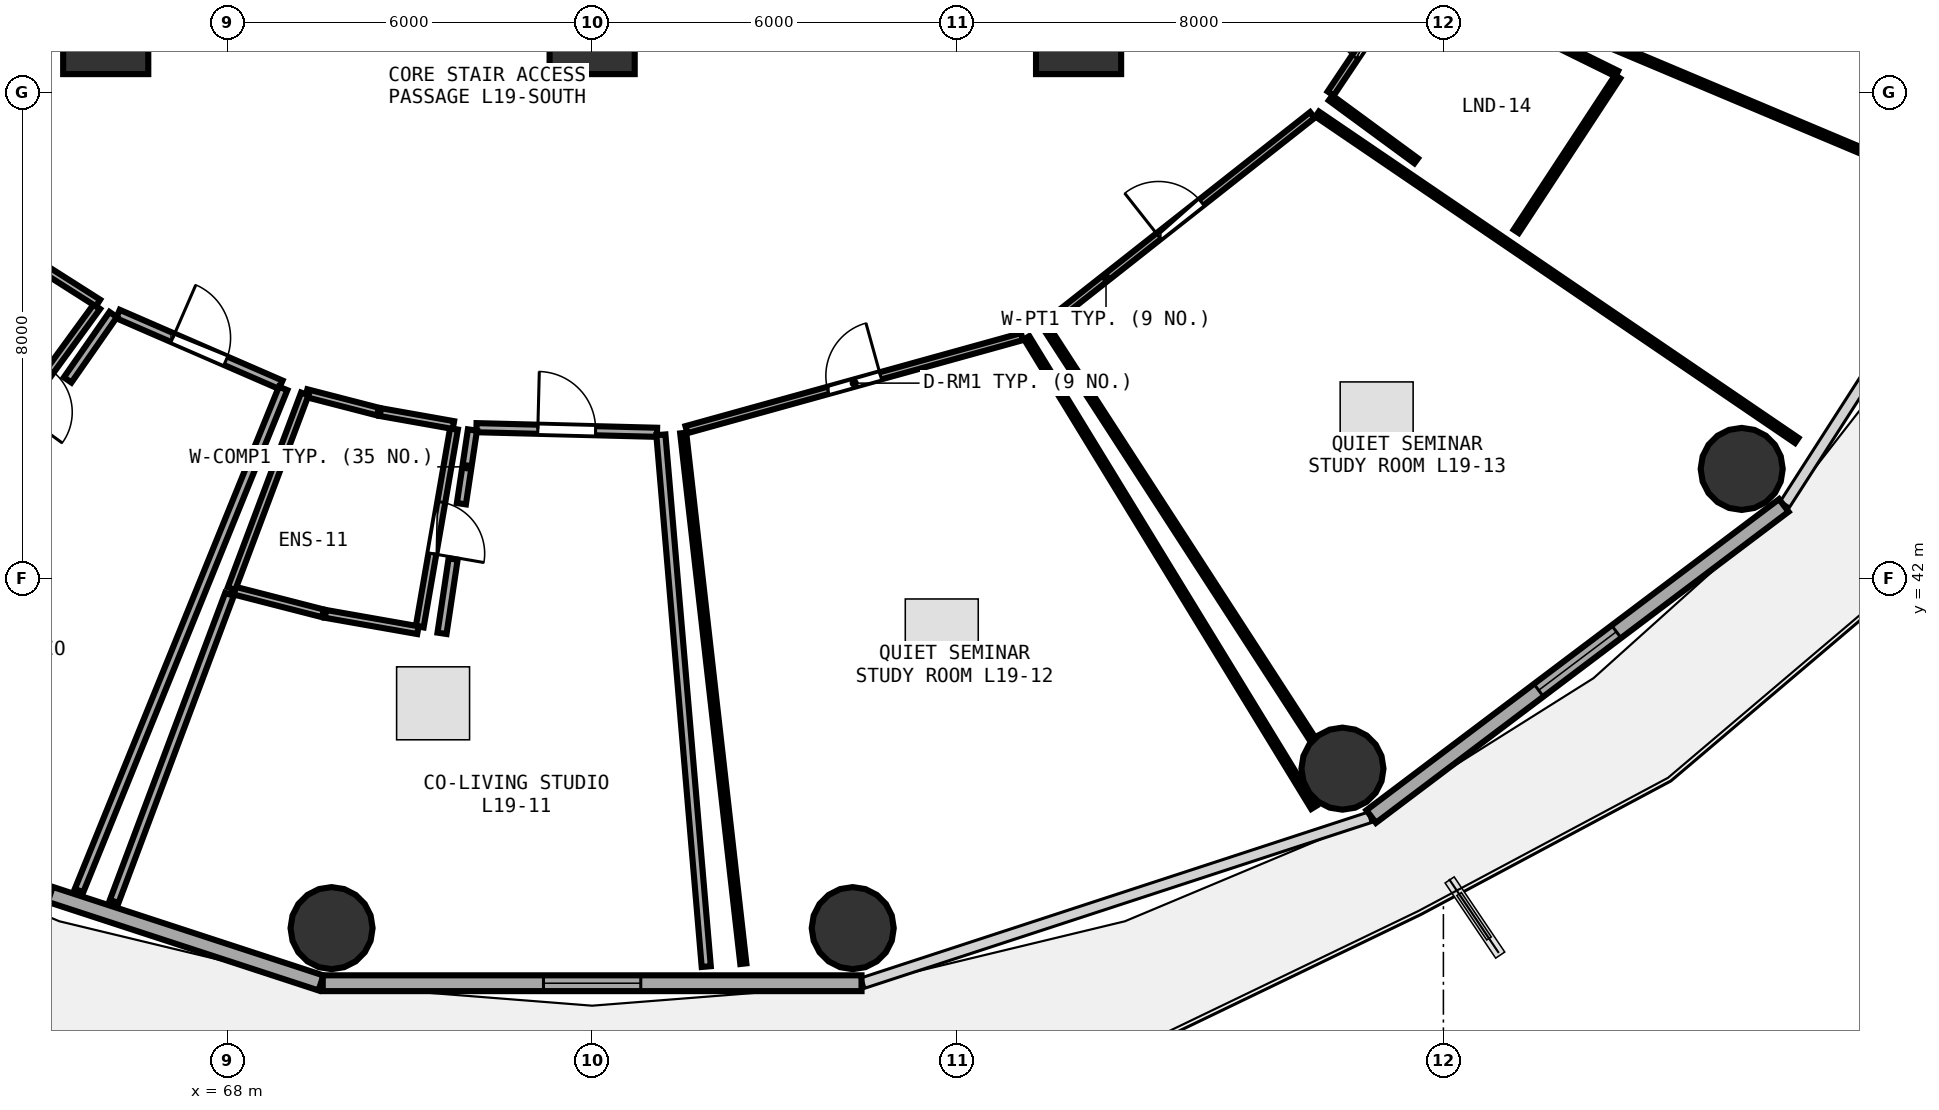
"""IFC4 building model, lengths in metres.
Left out: names, types, materials, properties, quantities, classifications, styles, units other than length and angle.
Written with IfcOpenShell. Run it as: python <this file> out.ifc"""

import sys

from ifc_helpers import new_model, si_unit, direction, frame, frame_2d, origin, origin_2d, place, context, subcontext, project, spatial, rectangle, circle, extrude, element, fill, save


model = new_model("IFC4")
c1 = context("Model", 3, precision=1e-05, world=origin(), true_north=direction((0.0, 1.0)))
c2 = subcontext(c1, "Body", "Model", "MODEL_VIEW")
j1 = project(units=[si_unit("LENGTHUNIT", "METRE"), si_unit("PLANEANGLEUNIT", "RADIAN")], contexts=[c1])
p1 = place(None, origin())
s1 = spatial("IfcSite", under=j1, at=p1, CompositionType="ELEMENT")
p2 = place(p1, origin())
s2 = spatial("IfcBuilding", under=s1, at=p2, CompositionType="ELEMENT")
p3 = place(p2, frame((0.0, 0.0, 76.35)))
s3 = spatial("IfcBuildingStorey", under=s2, at=p3, CompositionType="ELEMENT", Elevation=76.35)
for number, where, z_axis, x_axis in (
    (1, (66.0, 51.0, 0.0), (0.0, 0.0, 1.0), (1.0, 0.0, 0.0)),
    (2, (74.0, 51.0, 0.0), (0.0, 0.0, 1.0), (1.0, 0.0, 0.0)),
    (3, (82.0, 51.0, 0.0), (0.0, 0.0, 1.0), (1.0, 0.0, 0.0)),
):
    element("IfcColumn", number, at=place(p3, frame(where, z_axis=z_axis, x_axis=x_axis)), inside=s3, PredefinedType="PILASTER", context=c2, shape_type="SweptSolid", body=[
        extrude(rectangle(XDim=1.4, YDim=1.4, at=origin_2d()), origin(), (0.0, 0.0, 1.0), 3.75),
    ])
for number, where, z_axis, x_axis in (
    (4, (69.714, 36.255, 0.0), (0.0, 0.0, 1.0), (1.0, 0.0, 0.0)),
    (5, (78.286, 36.255, 0.0), (0.0, 0.0, 1.0), (1.0, 0.0, 0.0)),
    (6, (86.34, 38.878, 0.0), (0.0, 0.0, 1.0), (1.0, 0.0, 0.0)),
    (7, (92.906, 43.807, 0.0), (0.0, 0.0, 1.0), (1.0, 0.0, 0.0)),
):
    element("IfcColumn", number, at=place(p3, frame(where, z_axis=z_axis, x_axis=x_axis)), inside=s3, PredefinedType="COLUMN", context=c2, shape_type="SweptSolid", body=[
        extrude(circle(Radius=0.675, at=origin_2d()), origin(), (0.0, 0.0, 1.0), 3.75),
    ])
p4 = place(p3, frame((61.214, 38.077, 0.0), z_axis=(0.0, 0.0, 1.0), x_axis=(0.950471101963, -0.310812941064, 0.0)))
e8 = element("IfcWall", 8, at=p4, inside=s3, PredefinedType="SOLIDWALL", context=c2, shape_type="SweptSolid", body=[
    extrude(rectangle(XDim=8.76, YDim=0.26, at=frame_2d((4.38, 0.0))), origin(), (0.0, 0.0, 1.0), 3.475),
])
p5 = place(p4, frame((2.5, 0.0, 0.85)))
e9 = element("IfcOpeningElement", 9, at=p5, cuts=e8, PredefinedType="OPENING", context=c2, shape_type="SweptSolid", body=[
    extrude(rectangle(XDim=1.6, YDim=1.45, at=frame_2d((0.8, 0.725))), frame((0.0, 0.14, 0.0), z_axis=(0.0, -1.0, 0.0), x_axis=(1.0, 0.0, 0.0)), (0.0, 0.0, 1.0), 0.28),
])
p6 = place(p3, frame((69.57, 35.349, 0.0), z_axis=(0.0, 0.0, 1.0), x_axis=(1.0, 0.0, 0.0)))
e10 = element("IfcWall", 10, at=p6, inside=s3, PredefinedType="SOLIDWALL", context=c2, shape_type="SweptSolid", body=[
    extrude(rectangle(XDim=8.861, YDim=0.26, at=frame_2d((4.43, 0.0))), origin(), (0.0, 0.0, 1.0), 3.475),
])
p7 = place(p6, frame((3.63, 0.0, 0.85)))
e11 = element("IfcOpeningElement", 11, at=p7, cuts=e10, PredefinedType="OPENING", context=c2, shape_type="SweptSolid", body=[
    extrude(rectangle(XDim=1.6, YDim=1.45, at=frame_2d((0.8, 0.725))), frame((0.0, 0.14, 0.0), z_axis=(0.0, -1.0, 0.0), x_axis=(1.0, 0.0, 0.0)), (0.0, 0.0, 1.0), 0.28),
])
p8 = place(p3, frame((86.812, 38.09, 0.0), z_axis=(0.0, 0.0, 1.0), x_axis=(0.798501507879, 0.601992808857, 0.0)))
e12 = element("IfcWall", 12, at=p8, inside=s3, PredefinedType="SOLIDWALL", context=c2, shape_type="SweptSolid", body=[
    extrude(rectangle(XDim=8.499, YDim=0.26, at=frame_2d((4.25, 0.0))), origin(), (0.0, 0.0, 1.0), 3.475),
])
p9 = place(p8, frame((3.45, 0.0, 0.85)))
e13 = element("IfcOpeningElement", 13, at=p9, cuts=e12, PredefinedType="OPENING", context=c2, shape_type="SweptSolid", body=[
    extrude(rectangle(XDim=1.6, YDim=1.45, at=frame_2d((0.8, 0.725))), frame((0.0, 0.14, 0.0), z_axis=(0.0, -1.0, 0.0), x_axis=(1.0, 0.0, 0.0)), (0.0, 0.0, 1.0), 0.28),
])
p10 = place(p3, frame((65.855, 46.477, 0.0), z_axis=(0.0, 0.0, 1.0), x_axis=(-0.589016516568, -0.808120995402, 0.0)))
e14 = element("IfcWall", 14, at=p10, inside=s3, PredefinedType="PLUMBINGWALL", context=c2, shape_type="SweptSolid", body=[
    extrude(rectangle(XDim=3.435, YDim=0.13, at=frame_2d((1.718, 0.0))), origin(), (0.0, 0.0, 1.0), 3.175),
])
p11 = place(p10, frame((1.288, 0.0, 0.0)))
e15 = element("IfcOpeningElement", 15, at=p11, cuts=e14, PredefinedType="OPENING", context=c2, shape_type="SweptSolid", body=[
    extrude(rectangle(XDim=0.86, YDim=2.05, at=frame_2d((0.43, 1.025))), frame((0.0, 0.075, 0.0), z_axis=(0.0, -1.0, 0.0), x_axis=(1.0, 0.0, 0.0)), (0.0, 0.0, 1.0), 0.15),
])
p12 = place(p3, frame((66.201, 46.355, 0.0), z_axis=(0.0, 0.0, 1.0), x_axis=(0.917173751057, -0.398487528503, 0.0)))
e16 = element("IfcWall", 16, at=p12, inside=s3, PredefinedType="PARTITIONING", context=c2, shape_type="SweptSolid", body=[
    extrude(rectangle(XDim=2.919, YDim=0.15, at=frame_2d((1.459, 0.0))), origin(), (0.0, 0.0, 1.0), 2.925),
])
p13 = place(p12, frame((0.984, 0.0, 0.0)))
e17 = element("IfcOpeningElement", 17, at=p13, cuts=e16, PredefinedType="OPENING", context=c2, shape_type="SweptSolid", body=[
    extrude(rectangle(XDim=0.95, YDim=2.08, at=frame_2d((0.475, 1.04))), frame((0.0, 0.085, 0.0), z_axis=(0.0, -1.0, 0.0), x_axis=(1.0, 0.0, 0.0)), (0.0, 0.0, 1.0), 0.17),
])
p14 = place(p3, frame((71.728, 44.466, 0.0), z_axis=(0.0, 0.0, 1.0), x_axis=(-0.170592496202, -0.985341666753, 0.0)))
e18 = element("IfcWall", 18, at=p14, inside=s3, PredefinedType="PLUMBINGWALL", context=c2, shape_type="SweptSolid", body=[
    extrude(rectangle(XDim=3.303, YDim=0.13, at=frame_2d((1.651, 0.0))), origin(), (0.0, 0.0, 1.0), 3.175),
])
p15 = place(p14, frame((1.222, 0.0, 0.0)))
e19 = element("IfcOpeningElement", 19, at=p15, cuts=e18, PredefinedType="OPENING", context=c2, shape_type="SweptSolid", body=[
    extrude(rectangle(XDim=0.86, YDim=2.05, at=frame_2d((0.43, 1.025))), frame((0.0, 0.075, 0.0), z_axis=(0.0, -1.0, 0.0), x_axis=(1.0, 0.0, 0.0)), (0.0, 0.0, 1.0), 0.15),
])
p16 = place(p3, frame((72.097, 44.486, 0.0), z_axis=(0.0, 0.0, 1.0), x_axis=(0.999671268913, -0.025638917871, 0.0)))
e20 = element("IfcWall", 20, at=p16, inside=s3, PredefinedType="PARTITIONING", context=c2, shape_type="SweptSolid", body=[
    extrude(rectangle(XDim=2.971, YDim=0.15, at=frame_2d((1.485, 0.0))), origin(), (0.0, 0.0, 1.0), 3.48),
])
p17 = place(p16, frame((1.01, 0.0, 0.0)))
e21 = element("IfcOpeningElement", 21, at=p17, cuts=e20, PredefinedType="OPENING", context=c2, shape_type="SweptSolid", body=[
    extrude(rectangle(XDim=0.95, YDim=2.08, at=frame_2d((0.475, 1.04))), frame((0.0, 0.085, 0.0), z_axis=(0.0, -1.0, 0.0), x_axis=(1.0, 0.0, 0.0)), (0.0, 0.0, 1.0), 0.17),
])
p18 = place(p3, frame((75.551, 44.453, 0.0), z_axis=(0.0, 0.0, 1.0), x_axis=(0.963633279283, 0.267228185374, 0.0)))
e22 = element("IfcWall", 22, at=p18, inside=s3, PredefinedType="PARTITIONING", context=c2, shape_type="SweptSolid", body=[
    extrude(rectangle(XDim=5.726, YDim=0.12, at=frame_2d((2.863, 0.0))), origin(), (0.0, 0.0, 1.0), 2.925),
])
p19 = place(p18, frame((2.413, 0.0, 0.0)))
e23 = element("IfcOpeningElement", 23, at=p19, cuts=e22, PredefinedType="OPENING", context=c2, shape_type="SweptSolid", body=[
    extrude(rectangle(XDim=0.9, YDim=2.08, at=frame_2d((0.45, 1.04))), frame((0.0, 0.07, 0.0), z_axis=(0.0, -1.0, 0.0), x_axis=(1.0, 0.0, 0.0)), (0.0, 0.0, 1.0), 0.14),
])
p20 = place(p3, frame((81.494, 46.198, 0.0), z_axis=(0.0, 0.0, 1.0), x_axis=(0.785315722545, 0.619095482074, 0.0)))
e24 = element("IfcWall", 24, at=p20, inside=s3, PredefinedType="PARTITIONING", context=c2, shape_type="SweptSolid", body=[
    extrude(rectangle(XDim=5.54, YDim=0.12, at=frame_2d((2.77, 0.0))), origin(), (0.0, 0.0, 1.0), 2.925),
])
p21 = place(p20, frame((2.32, 0.0, 0.0)))
e25 = element("IfcOpeningElement", 25, at=p21, cuts=e24, PredefinedType="OPENING", context=c2, shape_type="SweptSolid", body=[
    extrude(rectangle(XDim=0.9, YDim=2.08, at=frame_2d((0.45, 1.04))), frame((0.0, 0.07, 0.0), z_axis=(0.0, -1.0, 0.0), x_axis=(1.0, 0.0, 0.0)), (0.0, 0.0, 1.0), 0.14),
])
p22 = place(p3, frame((86.146, 49.981, 0.0), z_axis=(0.0, 0.0, 1.0), x_axis=(0.556604342457, 0.83077771152, 0.0)))
e26 = element("IfcWall", 26, at=p22, inside=s3, PredefinedType="PARTITIONING", context=c2, shape_type="SweptSolid", body=[
    extrude(rectangle(XDim=2.336, YDim=0.12, at=frame_2d((1.168, 0.0))), origin(), (0.0, 0.0, 1.0), 2.925),
])
p23 = place(p22, frame((0.718, 0.0, 0.0)))
e27 = element("IfcOpeningElement", 27, at=p23, cuts=e26, PredefinedType="OPENING", context=c2, shape_type="SweptSolid", body=[
    extrude(rectangle(XDim=0.9, YDim=2.08, at=frame_2d((0.45, 1.04))), frame((0.0, 0.07, 0.0), z_axis=(0.0, -1.0, 0.0), x_axis=(1.0, 0.0, 0.0)), (0.0, 0.0, 1.0), 0.14),
])
p24 = place(p3, frame((64.872, 47.172, 0.0), z_axis=(0.0, 0.0, 1.0), x_axis=(0.843822426876, -0.536622504095, 0.0)))
e28 = element("IfcWall", 28, at=p24, inside=s3, PredefinedType="PLUMBINGWALL", context=c2, shape_type="SweptSolid", body=[
    extrude(rectangle(XDim=1.187, YDim=0.13, at=frame_2d((0.593, 0.0))), origin(), (0.0, 0.0, 1.0), 3.48),
])
p25 = place(p3, frame((68.918, 45.131, 0.0), z_axis=(0.0, 0.0, 1.0), x_axis=(-0.376588613193, -0.926380600193, 0.0)))
e29 = element("IfcWall", 29, at=p25, inside=s3, PredefinedType="PARTITIONING", context=c2, shape_type="SweptSolid", body=[
    extrude(rectangle(XDim=8.914, YDim=0.15, at=frame_2d((4.457, 0.0))), origin(), (0.0, 0.0, 1.0), 2.925),
])
p26 = place(p3, frame((65.374, 45.27, 0.0), z_axis=(0.0, 0.0, 1.0), x_axis=(0.57134818524, 0.82070777456, 0.0)))
e30 = element("IfcWall", 30, at=p26, inside=s3, PredefinedType="PARTITIONING", context=c2, shape_type="SweptSolid", body=[
    extrude(rectangle(XDim=1.311, YDim=0.15, at=frame_2d((0.656, 0.0))), origin(), (0.0, 0.0, 1.0), 3.235),
])
p27 = place(p3, frame((69.3, 45.054, 0.0), z_axis=(0.0, 0.0, 1.0), x_axis=(0.968247539973, -0.249993402585, 0.0)))
e31 = element("IfcWall", 31, at=p27, inside=s3, PredefinedType="PLUMBINGWALL", context=c2, shape_type="SweptSolid", body=[
    extrude(rectangle(XDim=1.216, YDim=0.13, at=frame_2d((0.608, 0.0))), origin(), (0.0, 0.0, 1.0), 3.48),
])
p28 = place(p3, frame((70.517, 44.741, 0.0), z_axis=(0.0, 0.0, 1.0), x_axis=(0.98466652622, -0.174447218786, 0.0)))
e32 = element("IfcWall", 32, at=p28, inside=s3, PredefinedType="PLUMBINGWALL", context=c2, shape_type="SweptSolid", body=[
    extrude(rectangle(XDim=1.22, YDim=0.13, at=frame_2d((0.61, 0.0))), origin(), (0.0, 0.0, 1.0), 3.48),
])
p29 = place(p3, frame((71.134, 41.156, 0.0), z_axis=(0.0, 0.0, 1.0), x_axis=(-0.984831248295, 0.173514876545, 0.0)))
e33 = element("IfcWall", 33, at=p29, inside=s3, PredefinedType="PLUMBINGWALL", context=c2, shape_type="SweptSolid", body=[
    extrude(rectangle(XDim=1.545, YDim=0.13, at=frame_2d((0.772, 0.0))), origin(), (0.0, 0.0, 1.0), 3.48),
])
p30 = place(p3, frame((69.573, 41.432, 0.0), z_axis=(0.0, 0.0, 1.0), x_axis=(-0.968594416315, 0.248646046989, 0.0)))
e34 = element("IfcWall", 34, at=p30, inside=s3, PredefinedType="PLUMBINGWALL", context=c2, shape_type="SweptSolid", body=[
    extrude(rectangle(XDim=1.541, YDim=0.13, at=frame_2d((0.77, 0.0))), origin(), (0.0, 0.0, 1.0), 2.925),
])
p31 = place(p3, frame((68.069, 41.839, 0.0), z_axis=(0.0, 0.0, 1.0), x_axis=(0.352202531552, 0.935923809275, 0.0)))
e35 = element("IfcWall", 35, at=p31, inside=s3, PredefinedType="PLUMBINGWALL", context=c2, shape_type="SweptSolid", body=[
    extrude(rectangle(XDim=3.421, YDim=0.13, at=frame_2d((1.71, 0.0))), origin(), (0.0, 0.0, 1.0), 2.925),
])
p32 = place(p3, frame((75.13, 44.368, 0.0), z_axis=(0.0, 0.0, 1.0), x_axis=(0.085031915446, -0.996378228062, 0.0)))
e36 = element("IfcWall", 36, at=p32, inside=s3, PredefinedType="PARTITIONING", context=c2, shape_type="SweptSolid", body=[
    extrude(rectangle(XDim=8.777, YDim=0.15, at=frame_2d((4.389, 0.0))), origin(), (0.0, 0.0, 1.0), 2.975),
])
p33 = place(p3, frame((66.139, 36.694, 0.0), z_axis=(0.0, 0.0, 1.0), x_axis=(0.351589591196, 0.936154239088, 0.0)))
e37 = element("IfcWall", 37, at=p33, inside=s3, PredefinedType="PARTITIONING", context=c2, shape_type="SweptSolid", body=[
    extrude(rectangle(XDim=5.395, YDim=0.15, at=frame_2d((2.697, 0.0))), origin(), (0.0, 0.0, 1.0), 2.975),
])
p34 = place(p3, frame((71.531, 41.104, 0.0), z_axis=(0.0, 0.0, 1.0), x_axis=(0.147866770411, 0.989007289259, 0.0)))
e38 = element("IfcWall", 38, at=p34, inside=s3, PredefinedType="PARTITIONING", context=c2, shape_type="SweptSolid", body=[
    extrude(rectangle(XDim=1.235, YDim=0.15, at=frame_2d((0.618, 0.0))), origin(), (0.0, 0.0, 1.0), 3.175),
])
p35 = place(p3, frame((71.85, 43.235, 0.0), z_axis=(0.0, 0.0, 1.0), x_axis=(0.14797037904, 0.988991793154, 0.0)))
e39 = element("IfcWall", 39, at=p35, inside=s3, PredefinedType="PARTITIONING", context=c2, shape_type="SweptSolid", body=[
    extrude(rectangle(XDim=1.226, YDim=0.15, at=frame_2d((0.613, 0.0))), origin(), (0.0, 0.0, 1.0), 3.48),
])
p36 = place(p3, frame((81.147, 45.965, 0.0), z_axis=(0.0, 0.0, 1.0), x_axis=(0.521624536189, -0.853175153908, 0.0)))
e40 = element("IfcWall", 40, at=p36, inside=s3, PredefinedType="PARTITIONING", context=c2, shape_type="SweptSolid", body=[
    extrude(rectangle(XDim=9.053, YDim=0.1, at=frame_2d((4.526, 0.0))), origin(), (0.0, 0.0, 1.0), 2.975),
])
p37 = place(p3, frame((76.487, 35.671, 0.0), z_axis=(0.0, 0.0, 1.0), x_axis=(-0.112612784854, 0.993638948858, 0.0)))
e41 = element("IfcWall", 41, at=p37, inside=s3, PredefinedType="PARTITIONING", context=c2, shape_type="SweptSolid", body=[
    extrude(rectangle(XDim=8.782, YDim=0.1, at=frame_2d((4.391, 0.0))), origin(), (0.0, 0.0, 1.0), 2.975),
])
p38 = place(p3, frame((85.925, 49.643, 0.0), z_axis=(0.0, 0.0, 1.0), x_axis=(0.826688408753, -0.562659999319, 0.0)))
e42 = element("IfcWall", 42, at=p38, inside=s3, PredefinedType="PARTITIONING", context=c2, shape_type="SweptSolid", body=[
    extrude(rectangle(XDim=9.539, YDim=0.1, at=frame_2d((4.77, 0.0))), origin(), (0.0, 0.0, 1.0), 2.975),
])
p39 = place(p3, frame((85.844, 39.372, 0.0), z_axis=(0.0, 0.0, 1.0), x_axis=(-0.543590830013, 0.839350349691, 0.0)))
e43 = element("IfcWall", 43, at=p39, inside=s3, PredefinedType="PARTITIONING", context=c2, shape_type="SweptSolid", body=[
    extrude(rectangle(XDim=8.048, YDim=0.1, at=frame_2d((4.024, 0.0))), origin(), (0.0, 0.0, 1.0), 3.175),
])
p40 = place(p3, frame((87.516, 51.953, 0.0), z_axis=(0.0, 0.0, 1.0), x_axis=(0.896816300292, -0.442403123328, 0.0)))
e44 = element("IfcWall", 44, at=p40, inside=s3, PredefinedType="PARTITIONING", context=c2, shape_type="SweptSolid", body=[
    extrude(rectangle(XDim=3.72, YDim=0.1, at=frame_2d((1.86, 0.0))), origin(), (0.0, 0.0, 1.0), 2.925),
])
p41 = place(p3, frame((90.866, 50.257, 0.0), z_axis=(0.0, 0.0, 1.0), x_axis=(-0.548626626693, -0.836067476035, 0.0)))
e45 = element("IfcWall", 45, at=p41, inside=s3, PredefinedType="PARTITIONING", context=c2, shape_type="SweptSolid", body=[
    extrude(rectangle(XDim=3.041, YDim=0.1, at=frame_2d((1.521, 0.0))), origin(), (0.0, 0.0, 1.0), 3.175),
])
p42 = place(p3, frame((87.552, 48.874, 0.0), z_axis=(0.0, 0.0, 1.0), x_axis=(-0.805902241708, 0.592048627065, 0.0)))
e46 = element("IfcWall", 46, at=p42, inside=s3, PredefinedType="PARTITIONING", context=c2, shape_type="SweptSolid", body=[
    extrude(rectangle(XDim=1.746, YDim=0.1, at=frame_2d((0.873, 0.0))), origin(), (0.0, 0.0, 1.0), 3.235),
])
p43 = place(p3, frame((96.59, 48.319, 0.0), z_axis=(0.0, 0.0, 1.0), x_axis=(-0.92163364156, 0.388061117279, 0.0)))
e47 = element("IfcWall", 47, at=p43, inside=s3, PredefinedType="PARTITIONING", context=c2, shape_type="SweptSolid", body=[
    extrude(rectangle(XDim=7.953, YDim=0.1, at=frame_2d((3.977, 0.0))), origin(), (0.0, 0.0, 1.0), 2.925),
])
p44 = place(p7, origin())
e48 = element("IfcWindow", 48, at=p44, inside=s3, PartitioningType="SINGLE_PANEL", PredefinedType="WINDOW", context=c2, shape_type="SweptSolid", body=[
    extrude(rectangle(XDim=1.6, YDim=1.45, at=frame_2d((0.8, 0.725))), frame((0.0, 0.03, 0.0), z_axis=(0.0, -1.0, 0.0), x_axis=(1.0, 0.0, 0.0)), (0.0, 0.0, 1.0), 0.06),
])
fill(e11, e48)
p45 = place(p9, origin())
e49 = element("IfcWindow", 49, at=p45, inside=s3, PartitioningType="SINGLE_PANEL", PredefinedType="WINDOW", context=c2, shape_type="SweptSolid", body=[
    extrude(rectangle(XDim=1.6, YDim=1.45, at=frame_2d((0.8, 0.725))), frame((0.0, 0.03, 0.0), z_axis=(0.0, -1.0, 0.0), x_axis=(1.0, 0.0, 0.0)), (0.0, 0.0, 1.0), 0.06),
])
fill(e13, e49)
p46 = place(p13, origin())
e50 = element("IfcDoor", 50, at=p46, inside=s3, OperationType="SINGLE_SWING_LEFT", PredefinedType="DOOR", context=c2, shape_type="SweptSolid", body=[
    extrude(rectangle(XDim=0.95, YDim=2.08, at=frame_2d((0.475, 1.04))), frame((0.0, 0.025, 0.0), z_axis=(0.0, -1.0, 0.0), x_axis=(1.0, 0.0, 0.0)), (0.0, 0.0, 1.0), 0.05),
])
fill(e17, e50)
p47 = place(p15, origin())
e51 = element("IfcDoor", 51, at=p47, inside=s3, OperationType="SINGLE_SWING_RIGHT", PredefinedType="DOOR", context=c2, shape_type="SweptSolid", body=[
    extrude(rectangle(XDim=0.86, YDim=2.05, at=frame_2d((0.43, 1.025))), frame((0.0, 0.025, 0.0), z_axis=(0.0, -1.0, 0.0), x_axis=(1.0, 0.0, 0.0)), (0.0, 0.0, 1.0), 0.05),
])
fill(e19, e51)
p48 = place(p17, origin())
e52 = element("IfcDoor", 52, at=p48, inside=s3, OperationType="SINGLE_SWING_LEFT", PredefinedType="DOOR", context=c2, shape_type="SweptSolid", body=[
    extrude(rectangle(XDim=0.95, YDim=2.08, at=frame_2d((0.475, 1.04))), frame((0.0, 0.025, 0.0), z_axis=(0.0, -1.0, 0.0), x_axis=(1.0, 0.0, 0.0)), (0.0, 0.0, 1.0), 0.05),
])
fill(e21, e52)
p49 = place(p19, origin())
e53 = element("IfcDoor", 53, at=p49, inside=s3, OperationType="SINGLE_SWING_RIGHT", PredefinedType="DOOR", context=c2, shape_type="SweptSolid", body=[
    extrude(rectangle(XDim=0.9, YDim=2.08, at=frame_2d((0.45, 1.04))), frame((0.0, 0.025, 0.0), z_axis=(0.0, -1.0, 0.0), x_axis=(1.0, 0.0, 0.0)), (0.0, 0.0, 1.0), 0.05),
])
fill(e23, e53)
p50 = place(p21, origin())
e54 = element("IfcDoor", 54, at=p50, inside=s3, OperationType="SINGLE_SWING_LEFT", PredefinedType="DOOR", context=c2, shape_type="SweptSolid", body=[
    extrude(rectangle(XDim=0.9, YDim=2.08, at=frame_2d((0.45, 1.04))), frame((0.0, 0.025, 0.0), z_axis=(0.0, -1.0, 0.0), x_axis=(1.0, 0.0, 0.0)), (0.0, 0.0, 1.0), 0.05),
])
fill(e25, e54)
p51 = place(p23, origin())
e55 = element("IfcDoor", 55, at=p51, inside=s3, OperationType="SINGLE_SWING_RIGHT", PredefinedType="DOOR", context=c2, shape_type="SweptSolid", body=[
    extrude(rectangle(XDim=0.9, YDim=2.08, at=frame_2d((0.45, 1.04))), frame((0.0, 0.025, 0.0), z_axis=(0.0, -1.0, 0.0), x_axis=(1.0, 0.0, 0.0)), (0.0, 0.0, 1.0), 0.05),
])
fill(e27, e55)
save(model, sys.argv[1])
